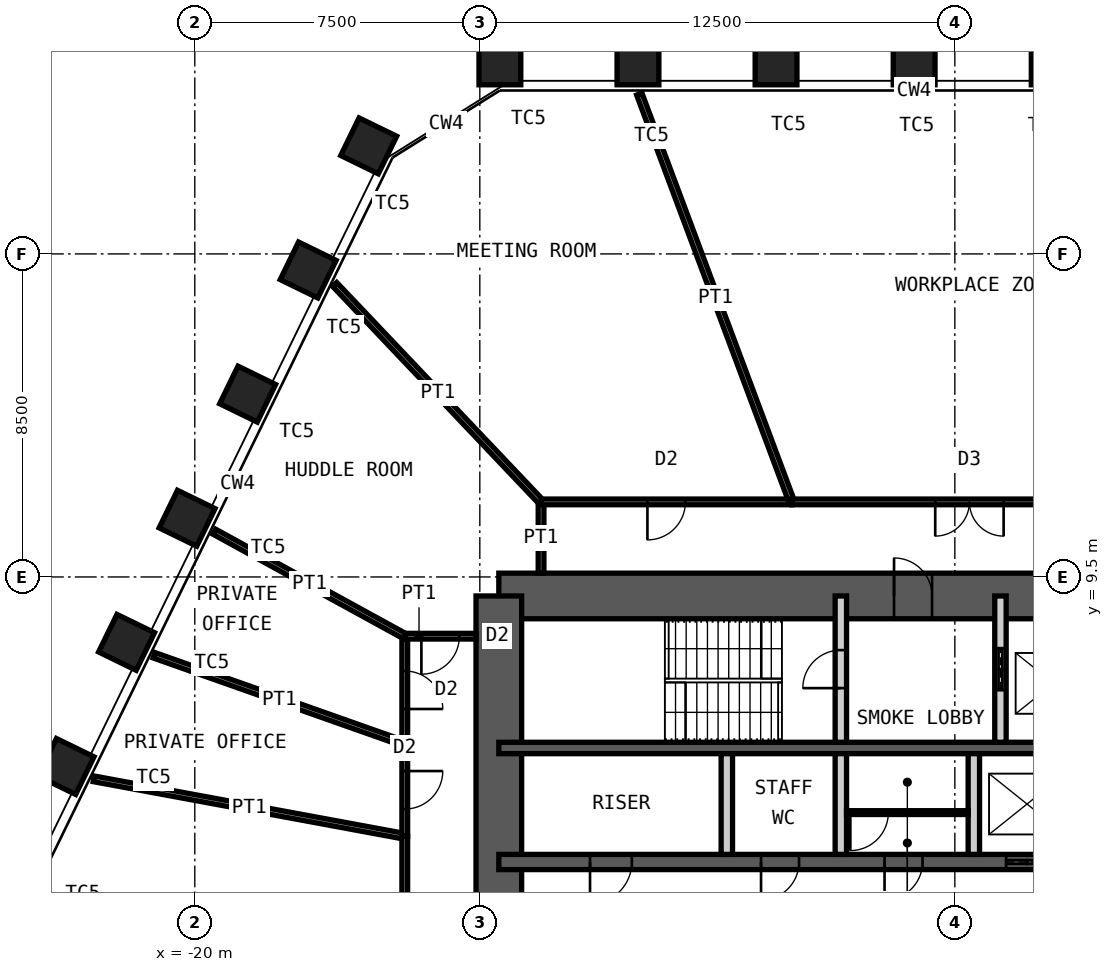
"""IFC4 building model, lengths in metres.
Left out: names, types, materials, properties, quantities, classifications, styles, units other than length and angle.
Written with IfcOpenShell. Run it as: python <this file> out.ifc"""

import sys

from ifc_helpers import new_model, si_unit, direction, frame, frame_2d, origin, origin_2d, place, context, subcontext, project, spatial, rectangle, hollow_rectangle, extrude, element, fill, save


model = new_model("IFC4")
c1 = context("Model", 3, precision=1e-05, world=origin(), true_north=direction((0.0, 1.0)))
c2 = subcontext(c1, "Body", "Model", "MODEL_VIEW")
j1 = project(units=[si_unit("LENGTHUNIT", "METRE"), si_unit("PLANEANGLEUNIT", "RADIAN")], contexts=[c1])
p1 = place(None, origin())
s1 = spatial("IfcSite", under=j1, at=p1, CompositionType="ELEMENT")
p2 = place(p1, origin())
s2 = spatial("IfcBuilding", under=s1, at=p2, CompositionType="ELEMENT")
p3 = place(p2, frame((0.0, 0.0, 184.6)))
s3 = spatial("IfcBuildingStorey", under=s2, at=p3, CompositionType="ELEMENT", Elevation=184.6)
for number, where, z_axis, x_axis in (
    (1, (-11.972, 23.0, 0.0), (0.0, 0.0, 1.0), (-1.0, 0.0, 0.0)),
    (2, (-8.338, 23.0, 0.0), (0.0, 0.0, 1.0), (-1.0, 0.0, 0.0)),
    (3, (-4.705, 23.0, 0.0), (0.0, 0.0, 1.0), (-1.0, 0.0, 0.0)),
    (4, (-1.071, 23.0, 0.0), (0.0, 0.0, 1.0), (-1.0, 0.0, 0.0)),
    (5, (2.562, 23.0, 0.0), (0.0, 0.0, 1.0), (-1.0, 0.0, 0.0)),
    (6, (-23.388, 4.514, 0.0), (0.0, 0.0, 1.0), (-0.438, -0.899, 0.0)),
    (7, (-21.795, 7.78, 0.0), (0.0, 0.0, 1.0), (-0.438, -0.899, 0.0)),
    (8, (-20.203, 11.045, 0.0), (0.0, 0.0, 1.0), (-0.438, -0.899, 0.0)),
    (9, (-18.61, 14.311, 0.0), (0.0, 0.0, 1.0), (-0.438, -0.899, 0.0)),
    (10, (-17.017, 17.577, 0.0), (0.0, 0.0, 1.0), (-0.438, -0.899, 0.0)),
    (11, (-15.424, 20.843, 0.0), (0.0, 0.0, 1.0), (-0.438, -0.899, 0.0)),
):
    element("IfcColumn", number, at=place(p3, frame(where, z_axis=z_axis, x_axis=x_axis)), inside=s3, PredefinedType="COLUMN", context=c2, shape_type="SweptSolid", body=[
        extrude(hollow_rectangle(XDim=1.1, YDim=1.1, WallThickness=0.07, at=origin_2d()), origin(), (0.0, 0.0, 1.0), 4.2),
    ])
p4 = place(p3, frame((-12.0, 9.0, 0.0), z_axis=(0.0, 0.0, 1.0), x_axis=(1.0, 0.0, 0.0)))
e12 = element("IfcWall", 12, at=p4, inside=s3, PredefinedType="SHEAR", context=c2, shape_type="SweptSolid", body=[
    extrude(rectangle(XDim=24.0, YDim=1.2, at=frame_2d((12.0, 0.0))), origin(), (0.0, 0.0, 1.0), 4.2),
])
p5 = place(p4, frame((10.4, 0.0, 0.0)))
e13 = element("IfcOpeningElement", 13, at=p5, cuts=e12, PredefinedType="OPENING", context=c2, shape_type="SweptSolid", body=[
    extrude(rectangle(XDim=1.0, YDim=2.1, at=frame_2d((0.5, 1.05))), frame((0.0, 0.61, 0.0), z_axis=(0.0, -1.0, 0.0), x_axis=(1.0, 0.0, 0.0)), (0.0, 0.0, 1.0), 1.22),
])
p6 = place(p4, frame((17.6, 0.0, 0.0)))
e14 = element("IfcOpeningElement", 14, at=p6, cuts=e12, PredefinedType="OPENING", context=c2, shape_type="SweptSolid", body=[
    extrude(rectangle(XDim=0.9, YDim=2.1, at=frame_2d((0.45, 1.05))), frame((0.0, 0.61, 0.0), z_axis=(0.0, -1.0, 0.0), x_axis=(1.0, 0.0, 0.0)), (0.0, 0.0, 1.0), 1.22),
])
p7 = place(p4, frame((21.9, 0.0, 0.0)))
e15 = element("IfcOpeningElement", 15, at=p7, cuts=e12, PredefinedType="OPENING", context=c2, shape_type="SweptSolid", body=[
    extrude(rectangle(XDim=0.9, YDim=2.1, at=frame_2d((0.45, 1.05))), frame((0.0, 0.61, 0.0), z_axis=(0.0, -1.0, 0.0), x_axis=(1.0, 0.0, 0.0)), (0.0, 0.0, 1.0), 1.22),
])
p8 = place(p3, frame((-12.0, -9.0, 0.0), z_axis=(0.0, 0.0, 1.0), x_axis=(0.0, 1.0, 0.0)))
e16 = element("IfcWall", 16, at=p8, inside=s3, PredefinedType="SHEAR", context=c2, shape_type="SweptSolid", body=[
    extrude(rectangle(XDim=18.0, YDim=1.2, at=frame_2d((9.0, 0.0))), origin(), (0.0, 0.0, 1.0), 4.2),
])
p9 = place(p8, frame((8.1, 0.0, 0.0)))
e17 = element("IfcOpeningElement", 17, at=p9, cuts=e16, PredefinedType="OPENING", context=c2, shape_type="SweptSolid", body=[
    extrude(rectangle(XDim=1.8, YDim=2.1, at=frame_2d((0.9, 1.05))), frame((0.0, 0.61, 0.0), z_axis=(0.0, -1.0, 0.0), x_axis=(1.0, 0.0, 0.0)), (0.0, 0.0, 1.0), 1.22),
])
p10 = place(p3, frame((-12.0, 5.0, 0.0), z_axis=(0.0, 0.0, 1.0), x_axis=(1.0, 0.0, 0.0)))
e18 = element("IfcWall", 18, at=p10, inside=s3, PredefinedType="SHEAR", context=c2, shape_type="SweptSolid", body=[
    extrude(rectangle(XDim=24.0, YDim=0.3, at=frame_2d((12.0, 0.0))), origin(), (0.0, 0.0, 1.0), 4.2),
])
p11 = place(p3, frame((-12.0, 2.0, 0.0), z_axis=(0.0, 0.0, 1.0), x_axis=(1.0, 0.0, 0.0)))
e19 = element("IfcWall", 19, at=p11, inside=s3, PredefinedType="SHEAR", context=c2, shape_type="SweptSolid", body=[
    extrude(rectangle(XDim=24.0, YDim=0.4, at=frame_2d((12.0, 0.0))), origin(), (0.0, 0.0, 1.0), 4.2),
])
p12 = place(p11, frame((2.4, 0.0, 0.0)))
e20 = element("IfcOpeningElement", 20, at=p12, cuts=e19, PredefinedType="OPENING", context=c2, shape_type="SweptSolid", body=[
    extrude(rectangle(XDim=1.1, YDim=2.1, at=frame_2d((0.55, 1.05))), frame((0.0, 0.21, 0.0), z_axis=(0.0, -1.0, 0.0), x_axis=(1.0, 0.0, 0.0)), (0.0, 0.0, 1.0), 0.42),
])
p13 = place(p11, frame((22.0, 0.0, 0.0)))
e21 = element("IfcOpeningElement", 21, at=p13, cuts=e19, PredefinedType="OPENING", context=c2, shape_type="SweptSolid", body=[
    extrude(rectangle(XDim=1.1, YDim=2.1, at=frame_2d((0.55, 1.05))), frame((0.0, 0.21, 0.0), z_axis=(0.0, -1.0, 0.0), x_axis=(1.0, 0.0, 0.0)), (0.0, 0.0, 1.0), 0.42),
])
p14 = place(p11, frame((10.15, 0.0, 0.0)))
e22 = element("IfcOpeningElement", 22, at=p14, cuts=e19, PredefinedType="OPENING", context=c2, shape_type="SweptSolid", body=[
    extrude(rectangle(XDim=1.0, YDim=2.1, at=frame_2d((0.5, 1.05))), frame((0.0, 0.21, 0.0), z_axis=(0.0, -1.0, 0.0), x_axis=(1.0, 0.0, 0.0)), (0.0, 0.0, 1.0), 0.42),
])
p15 = place(p11, frame((6.9, 0.0, 0.0)))
e23 = element("IfcOpeningElement", 23, at=p15, cuts=e19, PredefinedType="OPENING", context=c2, shape_type="SweptSolid", body=[
    extrude(rectangle(XDim=1.0, YDim=2.1, at=frame_2d((0.5, 1.05))), frame((0.0, 0.21, 0.0), z_axis=(0.0, -1.0, 0.0), x_axis=(1.0, 0.0, 0.0)), (0.0, 0.0, 1.0), 0.42),
])
p16 = place(p11, frame((13.35, 0.0, 0.0)))
e24 = element("IfcOpeningElement", 24, at=p16, cuts=e19, PredefinedType="OPENING", context=c2, shape_type="SweptSolid", body=[
    extrude(rectangle(XDim=1.1, YDim=2.4, at=frame_2d((0.55, 1.2))), frame((0.0, 0.21, 0.0), z_axis=(0.0, -1.0, 0.0), x_axis=(1.0, 0.0, 0.0)), (0.0, 0.0, 1.0), 0.42),
])
p17 = place(p11, frame((16.15, 0.0, 0.0)))
e25 = element("IfcOpeningElement", 25, at=p17, cuts=e19, PredefinedType="OPENING", context=c2, shape_type="SweptSolid", body=[
    extrude(rectangle(XDim=1.1, YDim=2.4, at=frame_2d((0.55, 1.2))), frame((0.0, 0.21, 0.0), z_axis=(0.0, -1.0, 0.0), x_axis=(1.0, 0.0, 0.0)), (0.0, 0.0, 1.0), 0.42),
])
p18 = place(p11, frame((18.95, 0.0, 0.0)))
e26 = element("IfcOpeningElement", 26, at=p18, cuts=e19, PredefinedType="OPENING", context=c2, shape_type="SweptSolid", body=[
    extrude(rectangle(XDim=1.1, YDim=2.4, at=frame_2d((0.55, 1.2))), frame((0.0, 0.21, 0.0), z_axis=(0.0, -1.0, 0.0), x_axis=(1.0, 0.0, 0.0)), (0.0, 0.0, 1.0), 0.42),
])
p19 = place(p3, frame((-3.0, 5.15, 0.0), z_axis=(0.0, 0.0, 1.0), x_axis=(0.0, 1.0, 0.0)))
e27 = element("IfcWall", 27, at=p19, inside=s3, PredefinedType="PARTITIONING", context=c2, shape_type="SweptSolid", body=[
    extrude(rectangle(XDim=3.85, YDim=0.3, at=frame_2d((1.925, 0.0))), origin(), (0.0, 0.0, 1.0), 3.98),
])
p20 = place(p19, frame((1.425, 0.0, 0.0)))
e28 = element("IfcOpeningElement", 28, at=p20, cuts=e27, PredefinedType="OPENING", context=c2, shape_type="SweptSolid", body=[
    extrude(rectangle(XDim=1.0, YDim=2.1, at=frame_2d((0.5, 1.05))), frame((0.0, 0.16, 0.0), z_axis=(0.0, -1.0, 0.0), x_axis=(1.0, 0.0, 0.0)), (0.0, 0.0, 1.0), 0.32),
])
p21 = place(p3, frame((1.2, 5.15, 0.0), z_axis=(0.0, 0.0, 1.0), x_axis=(0.0, 1.0, 0.0)))
e29 = element("IfcWall", 29, at=p21, inside=s3, PredefinedType="PARTITIONING", context=c2, shape_type="SweptSolid", body=[
    extrude(rectangle(XDim=3.85, YDim=0.3, at=frame_2d((1.925, 0.0))), origin(), (0.0, 0.0, 1.0), 3.98),
])
p22 = place(p21, frame((1.375, 0.0, 0.0)))
e30 = element("IfcOpeningElement", 30, at=p22, cuts=e29, PredefinedType="OPENING", context=c2, shape_type="SweptSolid", body=[
    extrude(rectangle(XDim=1.1, YDim=2.4, at=frame_2d((0.55, 1.2))), frame((0.0, 0.16, 0.0), z_axis=(0.0, -1.0, 0.0), x_axis=(1.0, 0.0, 0.0)), (0.0, 0.0, 1.0), 0.32),
])
for number, where, z_axis, x_axis in (
    (31, (-6.0, 2.2, 0.0), (0.0, 0.0, 1.0), (0.0, 1.0, 0.0)),
    (32, (-3.0, 2.2, 0.0), (0.0, 0.0, 1.0), (0.0, 1.0, 0.0)),
    (33, (0.5, 2.2, 0.0), (0.0, 0.0, 1.0), (0.0, 1.0, 0.0)),
):
    element("IfcWall", number, at=place(p3, frame(where, z_axis=z_axis, x_axis=x_axis)), inside=s3, PredefinedType="PARTITIONING", context=c2, shape_type="SweptSolid", body=[
        extrude(rectangle(XDim=2.65, YDim=0.3, at=frame_2d((1.325, 0.0))), origin(), (0.0, 0.0, 1.0), 3.98),
    ])
p23 = place(p3, frame((-2.85, 3.3, 0.0), z_axis=(0.0, 0.0, 1.0), x_axis=(1.0, 0.0, 0.0)))
e34 = element("IfcWall", 34, at=p23, inside=s3, PredefinedType="PARTITIONING", context=c2, shape_type="SweptSolid", body=[
    extrude(rectangle(XDim=3.2, YDim=0.1, at=frame_2d((1.6, 0.0))), origin(), (0.0, 0.0, 1.0), 3.98),
])
p24 = place(p23, frame((0.1, 0.0, 0.0)))
e35 = element("IfcOpeningElement", 35, at=p24, cuts=e34, PredefinedType="OPENING", context=c2, shape_type="SweptSolid", body=[
    extrude(rectangle(XDim=1.0, YDim=2.4, at=frame_2d((0.5, 1.2))), frame((0.0, 0.06, 0.0), z_axis=(0.0, -1.0, 0.0), x_axis=(1.0, 0.0, 0.0)), (0.0, 0.0, 1.0), 0.12),
])
p25 = place(p3, frame((-22.661, 4.189, 0.0), z_axis=(0.0, 0.0, 1.0), x_axis=(0.983345347199, -0.181746879316, 0.0)))
e36 = element("IfcWall", 36, at=p25, inside=s3, PredefinedType="PARTITIONING", context=c2, shape_type="SweptSolid", body=[
    extrude(rectangle(XDim=8.324, YDim=0.15, at=frame_2d((4.162, 0.0))), origin(), (0.0, 0.0, 1.0), 3.43),
])
p26 = place(p3, frame((-14.475, 2.676, 0.0), z_axis=(0.0, 0.0, 1.0), x_axis=(0.0, 1.0, 0.0)))
e37 = element("IfcWall", 37, at=p26, inside=s3, PredefinedType="PARTITIONING", context=c2, shape_type="SweptSolid", body=[
    extrude(rectangle(XDim=2.435, YDim=0.15, at=frame_2d((1.217, 0.0))), origin(), (0.0, 0.0, 1.0), 4.03),
])
p27 = place(p26, frame((0.717, 0.0, 0.0)))
e38 = element("IfcOpeningElement", 38, at=p27, cuts=e37, PredefinedType="OPENING", context=c2, shape_type="SweptSolid", body=[
    extrude(rectangle(XDim=1.0, YDim=2.4, at=frame_2d((0.5, 1.2))), frame((0.0, 0.085, 0.0), z_axis=(0.0, -1.0, 0.0), x_axis=(1.0, 0.0, 0.0)), (0.0, 0.0, 1.0), 0.17),
])
p28 = place(p3, frame((-21.072, 7.439, 0.0), z_axis=(0.0, 0.0, 1.0), x_axis=(0.94295553867, -0.332918686907, 0.0)))
e39 = element("IfcWall", 39, at=p28, inside=s3, PredefinedType="PARTITIONING", context=c2, shape_type="SweptSolid", body=[
    extrude(rectangle(XDim=6.996, YDim=0.15, at=frame_2d((3.498, 0.0))), origin(), (0.0, 0.0, 1.0), 3.43),
])
p29 = place(p3, frame((-14.475, 5.11, 0.0), z_axis=(0.0, 0.0, 1.0), x_axis=(0.0, 1.0, 0.0)))
e40 = element("IfcWall", 40, at=p29, inside=s3, PredefinedType="PARTITIONING", context=c2, shape_type="SweptSolid", body=[
    extrude(rectangle(XDim=2.831, YDim=0.15, at=frame_2d((1.416, 0.0))), origin(), (0.0, 0.0, 1.0), 4.03),
])
p30 = place(p29, frame((0.916, 0.0, 0.0)))
e41 = element("IfcOpeningElement", 41, at=p30, cuts=e40, PredefinedType="OPENING", context=c2, shape_type="SweptSolid", body=[
    extrude(rectangle(XDim=1.0, YDim=2.4, at=frame_2d((0.5, 1.2))), frame((0.0, 0.085, 0.0), z_axis=(0.0, -1.0, 0.0), x_axis=(1.0, 0.0, 0.0)), (0.0, 0.0, 1.0), 0.17),
])
p31 = place(p3, frame((-19.486, 10.69, 0.0), z_axis=(0.0, 0.0, 1.0), x_axis=(0.876724089264, -0.480993629172, 0.0)))
e42 = element("IfcWall", 42, at=p31, inside=s3, PredefinedType="PARTITIONING", context=c2, shape_type="SweptSolid", body=[
    extrude(rectangle(XDim=5.715, YDim=0.15, at=frame_2d((2.858, 0.0))), origin(), (0.0, 0.0, 1.0), 3.43),
])
p32 = place(p3, frame((-14.475, 7.941, 0.0), z_axis=(0.0, 0.0, 1.0), x_axis=(1.0, 0.0, 0.0)))
e43 = element("IfcWall", 43, at=p32, inside=s3, PredefinedType="PARTITIONING", context=c2, shape_type="SweptSolid", body=[
    extrude(rectangle(XDim=1.875, YDim=0.15, at=frame_2d((0.938, 0.0))), origin(), (0.0, 0.0, 1.0), 4.03),
])
p33 = place(p32, frame((0.438, 0.0, 0.0)))
e44 = element("IfcOpeningElement", 44, at=p33, cuts=e43, PredefinedType="OPENING", context=c2, shape_type="SweptSolid", body=[
    extrude(rectangle(XDim=1.0, YDim=2.4, at=frame_2d((0.5, 1.2))), frame((0.0, 0.085, 0.0), z_axis=(0.0, -1.0, 0.0), x_axis=(1.0, 0.0, 0.0)), (0.0, 0.0, 1.0), 0.17),
])
p34 = place(p3, frame((-10.889, 9.6, 0.0), z_axis=(0.0, 0.0, 1.0), x_axis=(0.0, 1.0, 0.0)))
e45 = element("IfcWall", 45, at=p34, inside=s3, PredefinedType="PARTITIONING", context=c2, shape_type="SweptSolid", body=[
    extrude(rectangle(XDim=1.875, YDim=0.15, at=frame_2d((0.938, 0.0))), origin(), (0.0, 0.0, 1.0), 4.03),
])
p35 = place(p3, frame((-16.319, 17.198, 0.0), z_axis=(0.0, 0.0, 1.0), x_axis=(0.688326413955, -0.725401094466, 0.0)))
e46 = element("IfcWall", 46, at=p35, inside=s3, PredefinedType="PARTITIONING", context=c2, shape_type="SweptSolid", body=[
    extrude(rectangle(XDim=7.889, YDim=0.15, at=frame_2d((3.944, 0.0))), origin(), (0.0, 0.0, 1.0), 4.03),
])
p36 = place(p3, frame((-10.889, 11.475, 0.0), z_axis=(0.0, 0.0, 1.0), x_axis=(1.0, 0.0, 0.0)))
e47 = element("IfcWall", 47, at=p36, inside=s3, PredefinedType="PARTITIONING", context=c2, shape_type="SweptSolid", body=[
    extrude(rectangle(XDim=6.598, YDim=0.15, at=frame_2d((3.299, 0.0))), origin(), (0.0, 0.0, 1.0), 4.03),
])
p37 = place(p36, frame((2.799, 0.0, 0.0)))
e48 = element("IfcOpeningElement", 48, at=p37, cuts=e47, PredefinedType="OPENING", context=c2, shape_type="SweptSolid", body=[
    extrude(rectangle(XDim=1.0, YDim=2.4, at=frame_2d((0.5, 1.2))), frame((0.0, 0.085, 0.0), z_axis=(0.0, -1.0, 0.0), x_axis=(1.0, 0.0, 0.0)), (0.0, 0.0, 1.0), 0.17),
])
p38 = place(p3, frame((-8.303, 22.206, 0.0), z_axis=(0.0, 0.0, 1.0), x_axis=(0.350242883069, -0.936658914899, 0.0)))
e49 = element("IfcWall", 49, at=p38, inside=s3, PredefinedType="PARTITIONING", context=c2, shape_type="SweptSolid", body=[
    extrude(rectangle(XDim=11.457, YDim=0.15, at=frame_2d((5.729, 0.0))), origin(), (0.0, 0.0, 1.0), 3.43),
])
p39 = place(p3, frame((-4.291, 11.475, 0.0), z_axis=(0.0, 0.0, 1.0), x_axis=(1.0, 0.0, 0.0)))
e50 = element("IfcWall", 50, at=p39, inside=s3, PredefinedType="PARTITIONING", context=c2, shape_type="SweptSolid", body=[
    extrude(rectangle(XDim=9.349, YDim=0.15, at=frame_2d((4.674, 0.0))), origin(), (0.0, 0.0, 1.0), 4.03),
])
p40 = place(p39, frame((3.774, 0.0, 0.0)))
e51 = element("IfcOpeningElement", 51, at=p40, cuts=e50, PredefinedType="OPENING", context=c2, shape_type="SweptSolid", body=[
    extrude(rectangle(XDim=1.8, YDim=2.4, at=frame_2d((0.9, 1.2))), frame((0.0, 0.085, 0.0), z_axis=(0.0, -1.0, 0.0), x_axis=(1.0, 0.0, 0.0)), (0.0, 0.0, 1.0), 0.17),
])
p41 = place(p3, frame((-14.475, -9.311, 0.0), z_axis=(0.0, 0.0, 1.0), x_axis=(0.0, 1.0, 0.0)))
e52 = element("IfcWall", 52, at=p41, inside=s3, PredefinedType="PARTITIONING", context=c2, shape_type="SweptSolid", body=[
    extrude(rectangle(XDim=11.987, YDim=0.15, at=frame_2d((5.993, 0.0))), origin(), (0.0, 0.0, 1.0), 4.03),
])
p42 = place(p41, frame((5.093, 0.0, 0.0)))
e53 = element("IfcOpeningElement", 53, at=p42, cuts=e52, PredefinedType="OPENING", context=c2, shape_type="SweptSolid", body=[
    extrude(rectangle(XDim=1.8, YDim=2.4, at=frame_2d((0.9, 1.2))), frame((0.0, 0.085, 0.0), z_axis=(0.0, -1.0, 0.0), x_axis=(1.0, 0.0, 0.0)), (0.0, 0.0, 1.0), 0.17),
])
p43 = place(p5, origin())
e54 = element("IfcDoor", 54, at=p43, inside=s3, OperationType="SINGLE_SWING_RIGHT", PredefinedType="DOOR", context=c2, shape_type="SweptSolid", body=[
    extrude(rectangle(XDim=1.0, YDim=2.1, at=frame_2d((0.5, 1.05))), frame((0.0, 0.025, 0.0), z_axis=(0.0, -1.0, 0.0), x_axis=(1.0, 0.0, 0.0)), (0.0, 0.0, 1.0), 0.05),
])
fill(e13, e54)
p44 = place(p20, origin())
e55 = element("IfcDoor", 55, at=p44, inside=s3, OperationType="SINGLE_SWING_RIGHT", PredefinedType="DOOR", context=c2, shape_type="SweptSolid", body=[
    extrude(rectangle(XDim=1.0, YDim=2.1, at=frame_2d((0.5, 1.05))), frame((0.0, 0.025, 0.0), z_axis=(0.0, -1.0, 0.0), x_axis=(1.0, 0.0, 0.0)), (0.0, 0.0, 1.0), 0.05),
])
fill(e28, e55)
p45 = place(p12, origin())
e56 = element("IfcDoor", 56, at=p45, inside=s3, OperationType="SINGLE_SWING_LEFT", PredefinedType="DOOR", context=c2, shape_type="SweptSolid", body=[
    extrude(rectangle(XDim=1.1, YDim=2.1, at=frame_2d((0.55, 1.05))), frame((0.0, 0.025, 0.0), z_axis=(0.0, -1.0, 0.0), x_axis=(1.0, 0.0, 0.0)), (0.0, 0.0, 1.0), 0.05),
])
fill(e20, e56)
p46 = place(p14, origin())
e57 = element("IfcDoor", 57, at=p46, inside=s3, OperationType="SINGLE_SWING_LEFT", PredefinedType="DOOR", context=c2, shape_type="SweptSolid", body=[
    extrude(rectangle(XDim=1.0, YDim=2.1, at=frame_2d((0.5, 1.05))), frame((0.0, 0.025, 0.0), z_axis=(0.0, -1.0, 0.0), x_axis=(1.0, 0.0, 0.0)), (0.0, 0.0, 1.0), 0.05),
])
fill(e22, e57)
p47 = place(p22, origin())
e58 = element("IfcDoor", 58, at=p47, inside=s3, OperationType="DOUBLE_DOOR_SLIDING", PredefinedType="DOOR", context=c2, shape_type="SweptSolid", body=[
    extrude(rectangle(XDim=1.1, YDim=2.4, at=frame_2d((0.55, 1.2))), frame((0.0, 0.025, 0.0), z_axis=(0.0, -1.0, 0.0), x_axis=(1.0, 0.0, 0.0)), (0.0, 0.0, 1.0), 0.05),
])
fill(e30, e58)
p48 = place(p15, origin())
e59 = element("IfcDoor", 59, at=p48, inside=s3, OperationType="SINGLE_SWING_LEFT", PredefinedType="DOOR", context=c2, shape_type="SweptSolid", body=[
    extrude(rectangle(XDim=1.0, YDim=2.1, at=frame_2d((0.5, 1.05))), frame((0.0, 0.025, 0.0), z_axis=(0.0, -1.0, 0.0), x_axis=(1.0, 0.0, 0.0)), (0.0, 0.0, 1.0), 0.05),
])
fill(e23, e59)
p49 = place(p16, origin())
e60 = element("IfcDoor", 60, at=p49, inside=s3, OperationType="DOUBLE_DOOR_SLIDING", PredefinedType="DOOR", context=c2, shape_type="SweptSolid", body=[
    extrude(rectangle(XDim=1.1, YDim=2.4, at=frame_2d((0.55, 1.2))), frame((0.0, 0.025, 0.0), z_axis=(0.0, -1.0, 0.0), x_axis=(1.0, 0.0, 0.0)), (0.0, 0.0, 1.0), 0.05),
])
fill(e24, e60)
p50 = place(p24, origin())
e61 = element("IfcDoor", 61, at=p50, inside=s3, OperationType="SINGLE_SWING_LEFT", PredefinedType="DOOR", context=c2, shape_type="SweptSolid", body=[
    extrude(rectangle(XDim=1.0, YDim=2.4, at=frame_2d((0.5, 1.2))), frame((0.0, 0.025, 0.0), z_axis=(0.0, -1.0, 0.0), x_axis=(1.0, 0.0, 0.0)), (0.0, 0.0, 1.0), 0.05),
])
fill(e35, e61)
p51 = place(p27, origin())
e62 = element("IfcDoor", 62, at=p51, inside=s3, OperationType="SINGLE_SWING_RIGHT", PredefinedType="DOOR", context=c2, shape_type="SweptSolid", body=[
    extrude(rectangle(XDim=1.0, YDim=2.4, at=frame_2d((0.5, 1.2))), frame((0.0, 0.025, 0.0), z_axis=(0.0, -1.0, 0.0), x_axis=(1.0, 0.0, 0.0)), (0.0, 0.0, 1.0), 0.05),
])
fill(e38, e62)
p52 = place(p30, origin())
e63 = element("IfcDoor", 63, at=p52, inside=s3, OperationType="SINGLE_SWING_LEFT", PredefinedType="DOOR", context=c2, shape_type="SweptSolid", body=[
    extrude(rectangle(XDim=1.0, YDim=2.4, at=frame_2d((0.5, 1.2))), frame((0.0, 0.025, 0.0), z_axis=(0.0, -1.0, 0.0), x_axis=(1.0, 0.0, 0.0)), (0.0, 0.0, 1.0), 0.05),
])
fill(e41, e63)
p53 = place(p33, origin())
e64 = element("IfcDoor", 64, at=p53, inside=s3, OperationType="SINGLE_SWING_LEFT", PredefinedType="DOOR", context=c2, shape_type="SweptSolid", body=[
    extrude(rectangle(XDim=1.0, YDim=2.4, at=frame_2d((0.5, 1.2))), frame((0.0, 0.025, 0.0), z_axis=(0.0, -1.0, 0.0), x_axis=(1.0, 0.0, 0.0)), (0.0, 0.0, 1.0), 0.05),
])
fill(e44, e64)
p54 = place(p37, origin())
e65 = element("IfcDoor", 65, at=p54, inside=s3, OperationType="SINGLE_SWING_LEFT", PredefinedType="DOOR", context=c2, shape_type="SweptSolid", body=[
    extrude(rectangle(XDim=1.0, YDim=2.4, at=frame_2d((0.5, 1.2))), frame((0.0, 0.025, 0.0), z_axis=(0.0, -1.0, 0.0), x_axis=(1.0, 0.0, 0.0)), (0.0, 0.0, 1.0), 0.05),
])
fill(e48, e65)
p55 = place(p40, origin())
e66 = element("IfcDoor", 66, at=p55, inside=s3, OperationType="DOUBLE_DOOR_DOUBLE_SWING", PredefinedType="DOOR", context=c2, shape_type="SweptSolid", body=[
    extrude(rectangle(XDim=1.8, YDim=2.4, at=frame_2d((0.9, 1.2))), frame((0.0, 0.025, 0.0), z_axis=(0.0, -1.0, 0.0), x_axis=(1.0, 0.0, 0.0)), (0.0, 0.0, 1.0), 0.05),
])
fill(e51, e66)
save(model, sys.argv[1])
